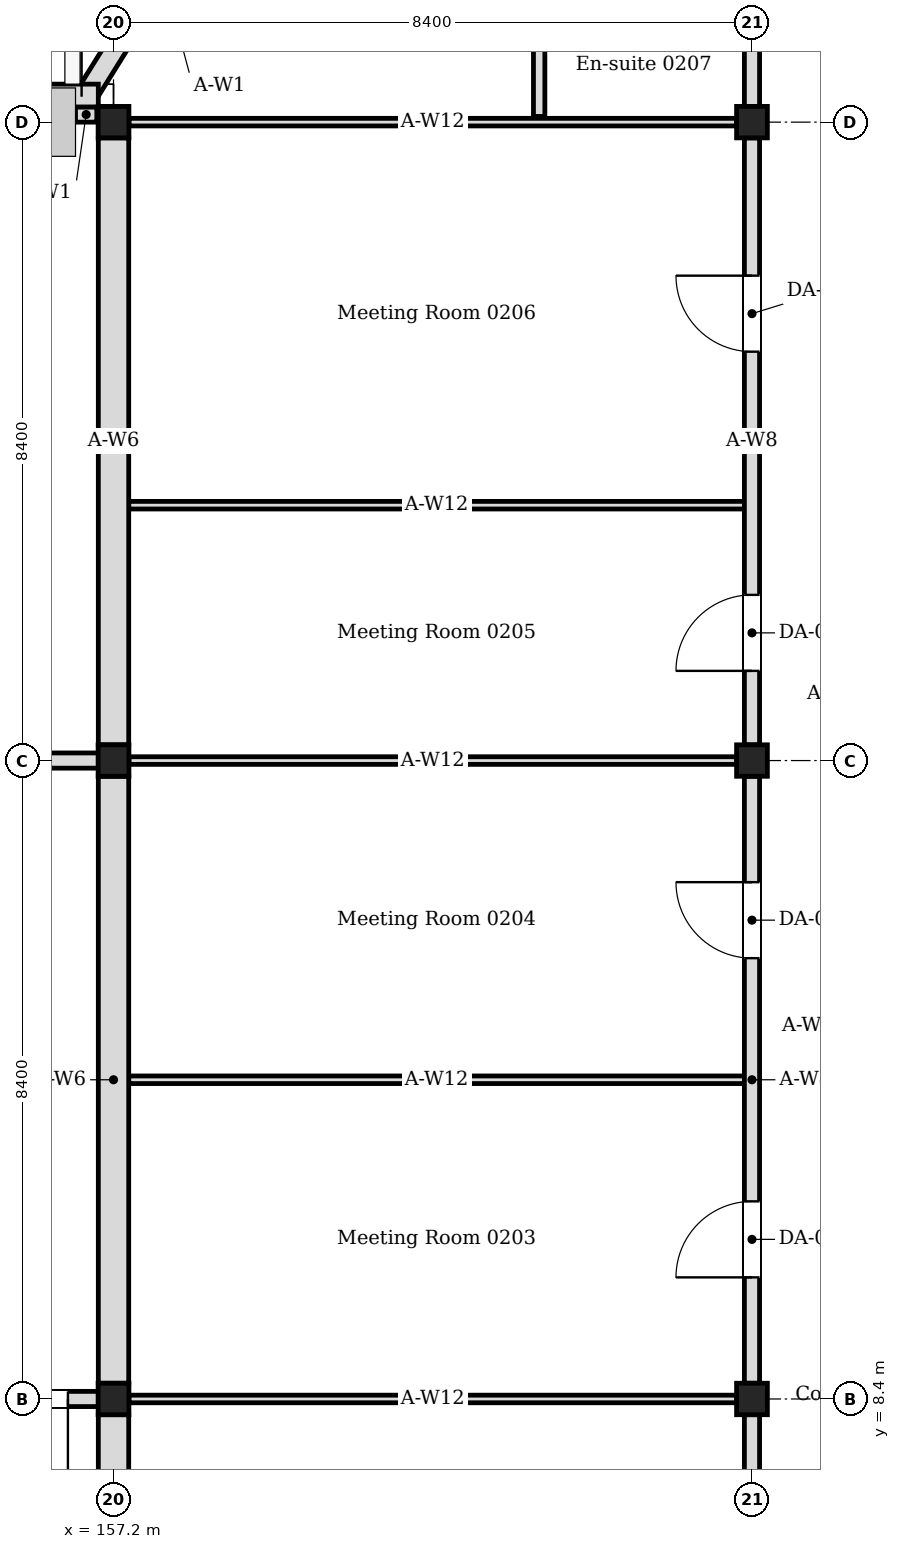
"""IFC4 building model, lengths in metres.
Left out: names, types, materials, properties, quantities, classifications, styles, units other than length and angle.
Written with IfcOpenShell. Run it as: python <this file> out.ifc"""

import sys

from ifc_helpers import new_model, si_unit, direction, frame, frame_2d, origin, origin_2d, place, context, subcontext, project, spatial, rectangle, i_section, extrude, element, fill, save


model = new_model("IFC4")
c1 = context("Model", 3, precision=1e-05, world=origin(), true_north=direction((0.0, 1.0)))
c2 = subcontext(c1, "Body", "Model", "MODEL_VIEW")
j1 = project(units=[si_unit("LENGTHUNIT", "METRE"), si_unit("PLANEANGLEUNIT", "RADIAN")], contexts=[c1])
p1 = place(None, origin())
s1 = spatial("IfcSite", under=j1, at=p1, CompositionType="ELEMENT")
p2 = place(p1, origin())
s2 = spatial("IfcBuilding", under=s1, at=p2, CompositionType="ELEMENT")
p3 = place(p2, frame((0.0, 0.0, 10.2)))
s3 = spatial("IfcBuildingStorey", under=s2, at=p3, CompositionType="ELEMENT", Elevation=10.2)
for number, where, z_axis, x_axis in (
    (1, (157.2, 8.4, 0.0), (0.0, 0.0, 1.0), (1.0, 0.0, 0.0)),
    (2, (157.2, 16.8, 0.0), (0.0, 0.0, 1.0), (1.0, 0.0, 0.0)),
    (3, (157.2, 25.2, 0.0), (0.0, 0.0, 1.0), (1.0, 0.0, 0.0)),
    (4, (165.6, 8.4, 0.0), (0.0, 0.0, 1.0), (1.0, 0.0, 0.0)),
    (5, (165.6, 16.8, 0.0), (0.0, 0.0, 1.0), (1.0, 0.0, 0.0)),
    (6, (165.6, 25.2, 0.0), (0.0, 0.0, 1.0), (1.0, 0.0, 0.0)),
):
    element("IfcColumn", number, at=place(p3, frame(where, z_axis=z_axis, x_axis=x_axis)), inside=s3, PredefinedType="COLUMN", context=c2, shape_type="SweptSolid", body=[
        extrude(i_section(OverallWidth=0.405, OverallDepth=0.414, WebThickness=0.018, FlangeThickness=0.028, FilletRadius=0.022, at=origin_2d()), origin(), (0.0, 0.0, 1.0), 4.2),
    ])
p4 = place(p3, frame((156.84, 25.2, 0.0), z_axis=(0.0, 0.0, 1.0), x_axis=(0.0, 1.0, 0.0)))
e7 = element("IfcWall", 7, at=p4, inside=s3, PredefinedType="SOLIDWALL", context=c2, shape_type="SweptSolid", body=[
    extrude(rectangle(XDim=0.2, YDim=0.28, at=frame_2d((0.1, 0.0))), origin(), (0.0, 0.0, 1.0), 4.05),
])
p5 = place(p3, frame((156.886, 25.624, 0.0), z_axis=(0.0, 0.0, 1.0), x_axis=(0.528992500338, 0.848626498871, 0.0)))
e8 = element("IfcWall", 8, at=p5, inside=s3, PredefinedType="SOLIDWALL", context=c2, shape_type="SweptSolid", body=[
    extrude(rectangle(XDim=4.145, YDim=0.28, at=frame_2d((2.072, 0.0))), origin(), (0.0, 0.0, 1.0), 4.05),
])
p6 = place(p5, frame((0.812, 0.0, 0.6)))
e9 = element("IfcOpeningElement", 9, at=p6, cuts=e8, PredefinedType="OPENING", context=c2, shape_type="SweptSolid", body=[
    extrude(rectangle(XDim=2.52, YDim=2.4, at=frame_2d((1.26, 1.2))), frame((0.0, 0.15, 0.0), z_axis=(0.0, -1.0, 0.0), x_axis=(1.0, 0.0, 0.0)), (0.0, 0.0, 1.0), 0.3),
])
p7 = place(p3, frame((151.1, 25.55, 0.0), z_axis=(0.0, 0.0, 1.0), x_axis=(1.0, 0.0, 0.0)))
e10 = element("IfcWall", 10, at=p7, inside=s3, PredefinedType="SOLIDWALL", context=c2, shape_type="SweptSolid", body=[
    extrude(rectangle(XDim=5.9, YDim=0.3, at=frame_2d((2.95, 0.0))), origin(), (0.0, 0.0, 1.0), 4.05),
])
p8 = place(p7, frame((0.34, 0.0, 1.5)))
e11 = element("IfcOpeningElement", 11, at=p8, cuts=e10, PredefinedType="OPENING", context=c2, shape_type="SweptSolid", body=[
    extrude(rectangle(XDim=1.2, YDim=1.2, at=frame_2d((0.6, 0.6))), frame((0.0, 0.16, 0.0), z_axis=(0.0, -1.0, 0.0), x_axis=(1.0, 0.0, 0.0)), (0.0, 0.0, 1.0), 0.32),
])
p9 = place(p7, frame((2.02, 0.0, 1.5)))
e12 = element("IfcOpeningElement", 12, at=p9, cuts=e10, PredefinedType="OPENING", context=c2, shape_type="SweptSolid", body=[
    extrude(rectangle(XDim=1.2, YDim=1.2, at=frame_2d((0.6, 0.6))), frame((0.0, 0.16, 0.0), z_axis=(0.0, -1.0, 0.0), x_axis=(1.0, 0.0, 0.0)), (0.0, 0.0, 1.0), 0.32),
])
p10 = place(p7, frame((3.7, 0.0, 1.5)))
e13 = element("IfcOpeningElement", 13, at=p10, cuts=e10, PredefinedType="OPENING", context=c2, shape_type="SweptSolid", body=[
    extrude(rectangle(XDim=1.2, YDim=1.2, at=frame_2d((0.6, 0.6))), frame((0.0, 0.16, 0.0), z_axis=(0.0, -1.0, 0.0), x_axis=(1.0, 0.0, 0.0)), (0.0, 0.0, 1.0), 0.32),
])
p11 = place(p3, frame((162.8, 25.275, 0.0), z_axis=(0.0, 0.0, 1.0), x_axis=(0.0, 1.0, 0.0)))
e14 = element("IfcWall", 14, at=p11, inside=s3, PredefinedType="PARTITIONING", context=c2, shape_type="SweptSolid", body=[
    extrude(rectangle(XDim=2.325, YDim=0.15, at=frame_2d((1.163, 0.0))), origin(), (0.0, 0.0, 1.0), 4.05),
])
for number, where, z_axis, x_axis in (
    (15, (157.403, 8.4, 0.0), (0.0, 0.0, 1.0), (1.0, 0.0, 0.0)),
    (16, (157.403, 16.8, 0.0), (0.0, 0.0, 1.0), (1.0, 0.0, 0.0)),
    (17, (157.403, 25.2, 0.0), (0.0, 0.0, 1.0), (1.0, 0.0, 0.0)),
):
    element("IfcWall", number, at=place(p3, frame(where, z_axis=z_axis, x_axis=x_axis)), inside=s3, PredefinedType="PARTITIONING", context=c2, shape_type="SweptSolid", body=[
        extrude(rectangle(XDim=7.995, YDim=0.1, at=frame_2d((3.998, 0.0))), origin(), (0.0, 0.0, 1.0), 3.604),
    ])
for number, where, z_axis, x_axis in (
    (18, (157.4, 12.6, 0.0), (0.0, 0.0, 1.0), (1.0, 0.0, 0.0)),
    (19, (157.4, 20.16, 0.0), (0.0, 0.0, 1.0), (1.0, 0.0, 0.0)),
):
    element("IfcWall", number, at=place(p3, frame(where, z_axis=z_axis, x_axis=x_axis)), inside=s3, PredefinedType="PARTITIONING", context=c2, shape_type="SweptSolid", body=[
        extrude(rectangle(XDim=8.1, YDim=0.1, at=frame_2d((4.05, 0.0))), origin(), (0.0, 0.0, 1.0), 3.604),
    ])
for number, where, z_axis, x_axis in (
    (20, (157.2, 0.207, 0.0), (0.0, 0.0, 1.0), (0.0, 1.0, 0.0)),
    (21, (157.2, 8.607, 0.0), (0.0, 0.0, 1.0), (0.0, 1.0, 0.0)),
):
    element("IfcWall", number, at=place(p3, frame(where, z_axis=z_axis, x_axis=x_axis)), inside=s3, PredefinedType="SOLIDWALL", context=c2, shape_type="SweptSolid", body=[
        extrude(rectangle(XDim=7.986, YDim=0.4, at=frame_2d((3.993, 0.0))), origin(), (0.0, 0.0, 1.0), 3.45),
    ])
p12 = place(p3, frame((157.2, 17.007, 0.0), z_axis=(0.0, 0.0, 1.0), x_axis=(0.0, 1.0, 0.0)))
e22 = element("IfcWall", 22, at=p12, inside=s3, PredefinedType="SOLIDWALL", context=c2, shape_type="SweptSolid", body=[
    extrude(rectangle(XDim=7.986, YDim=0.4, at=frame_2d((3.993, 0.0))), origin(), (0.0, 0.0, 1.0), 3.45),
])
p13 = place(p3, frame((165.6, 0.207, 0.0), z_axis=(0.0, 0.0, 1.0), x_axis=(0.0, 1.0, 0.0)))
e23 = element("IfcWall", 23, at=p13, inside=s3, PredefinedType="PARTITIONING", context=c2, shape_type="SweptSolid", body=[
    extrude(rectangle(XDim=7.986, YDim=0.2, at=frame_2d((3.993, 0.0))), origin(), (0.0, 0.0, 1.0), 3.45),
])
p14 = place(p13, frame((1.393, 0.0, 0.0)))
e24 = element("IfcOpeningElement", 24, at=p14, cuts=e23, PredefinedType="OPENING", context=c2, shape_type="SweptSolid", body=[
    extrude(rectangle(XDim=1.0, YDim=2.1, at=frame_2d((0.5, 1.05))), frame((0.0, 0.11, 0.0), z_axis=(0.0, -1.0, 0.0), x_axis=(1.0, 0.0, 0.0)), (0.0, 0.0, 1.0), 0.22),
])
p15 = place(p13, frame((5.593, 0.0, 0.0)))
e25 = element("IfcOpeningElement", 25, at=p15, cuts=e23, PredefinedType="OPENING", context=c2, shape_type="SweptSolid", body=[
    extrude(rectangle(XDim=1.0, YDim=2.1, at=frame_2d((0.5, 1.05))), frame((0.0, 0.11, 0.0), z_axis=(0.0, -1.0, 0.0), x_axis=(1.0, 0.0, 0.0)), (0.0, 0.0, 1.0), 0.22),
])
p16 = place(p3, frame((165.6, 8.607, 0.0), z_axis=(0.0, 0.0, 1.0), x_axis=(0.0, 1.0, 0.0)))
e26 = element("IfcWall", 26, at=p16, inside=s3, PredefinedType="PARTITIONING", context=c2, shape_type="SweptSolid", body=[
    extrude(rectangle(XDim=7.986, YDim=0.2, at=frame_2d((3.993, 0.0))), origin(), (0.0, 0.0, 1.0), 3.45),
])
p17 = place(p16, frame((1.393, 0.0, 0.0)))
e27 = element("IfcOpeningElement", 27, at=p17, cuts=e26, PredefinedType="OPENING", context=c2, shape_type="SweptSolid", body=[
    extrude(rectangle(XDim=1.0, YDim=2.1, at=frame_2d((0.5, 1.05))), frame((0.0, 0.11, 0.0), z_axis=(0.0, -1.0, 0.0), x_axis=(1.0, 0.0, 0.0)), (0.0, 0.0, 1.0), 0.22),
])
p18 = place(p16, frame((5.593, 0.0, 0.0)))
e28 = element("IfcOpeningElement", 28, at=p18, cuts=e26, PredefinedType="OPENING", context=c2, shape_type="SweptSolid", body=[
    extrude(rectangle(XDim=1.0, YDim=2.1, at=frame_2d((0.5, 1.05))), frame((0.0, 0.11, 0.0), z_axis=(0.0, -1.0, 0.0), x_axis=(1.0, 0.0, 0.0)), (0.0, 0.0, 1.0), 0.22),
])
p19 = place(p3, frame((165.6, 17.007, 0.0), z_axis=(0.0, 0.0, 1.0), x_axis=(0.0, 1.0, 0.0)))
e29 = element("IfcWall", 29, at=p19, inside=s3, PredefinedType="PARTITIONING", context=c2, shape_type="SweptSolid", body=[
    extrude(rectangle(XDim=7.986, YDim=0.2, at=frame_2d((3.993, 0.0))), origin(), (0.0, 0.0, 1.0), 3.45),
])
p20 = place(p19, frame((0.973, 0.0, 0.0)))
e30 = element("IfcOpeningElement", 30, at=p20, cuts=e29, PredefinedType="OPENING", context=c2, shape_type="SweptSolid", body=[
    extrude(rectangle(XDim=1.0, YDim=2.1, at=frame_2d((0.5, 1.05))), frame((0.0, 0.11, 0.0), z_axis=(0.0, -1.0, 0.0), x_axis=(1.0, 0.0, 0.0)), (0.0, 0.0, 1.0), 0.22),
])
p21 = place(p19, frame((5.173, 0.0, 0.0)))
e31 = element("IfcOpeningElement", 31, at=p21, cuts=e29, PredefinedType="OPENING", context=c2, shape_type="SweptSolid", body=[
    extrude(rectangle(XDim=1.0, YDim=2.1, at=frame_2d((0.5, 1.05))), frame((0.0, 0.11, 0.0), z_axis=(0.0, -1.0, 0.0), x_axis=(1.0, 0.0, 0.0)), (0.0, 0.0, 1.0), 0.22),
])
p22 = place(p3, frame((165.6, 25.407, 0.0), z_axis=(0.0, 0.0, 1.0), x_axis=(0.0, 1.0, 0.0)))
e32 = element("IfcWall", 32, at=p22, inside=s3, PredefinedType="PARTITIONING", context=c2, shape_type="SweptSolid", body=[
    extrude(rectangle(XDim=7.986, YDim=0.2, at=frame_2d((3.993, 0.0))), origin(), (0.0, 0.0, 1.0), 3.45),
])
p23 = place(p22, frame((2.493, 0.0, 0.0)))
e33 = element("IfcOpeningElement", 33, at=p23, cuts=e32, PredefinedType="OPENING", context=c2, shape_type="SweptSolid", body=[
    extrude(rectangle(XDim=1.2, YDim=2.1, at=frame_2d((0.6, 1.05))), frame((0.0, 0.11, 0.0), z_axis=(0.0, -1.0, 0.0), x_axis=(1.0, 0.0, 0.0)), (0.0, 0.0, 1.0), 0.22),
])
p24 = place(p22, frame((4.293, 0.0, 0.0)))
e34 = element("IfcOpeningElement", 34, at=p24, cuts=e32, PredefinedType="OPENING", context=c2, shape_type="SweptSolid", body=[
    extrude(rectangle(XDim=1.2, YDim=2.1, at=frame_2d((0.6, 1.05))), frame((0.0, 0.11, 0.0), z_axis=(0.0, -1.0, 0.0), x_axis=(1.0, 0.0, 0.0)), (0.0, 0.0, 1.0), 0.22),
])
p25 = place(p3, frame((151.35, 8.4, 0.0), z_axis=(0.0, 0.0, 1.0), x_axis=(1.0, 0.0, 0.0)))
e35 = element("IfcWall", 35, at=p25, inside=s3, PredefinedType="PARTITIONING", context=c2, shape_type="SweptSolid", body=[
    extrude(rectangle(XDim=5.85, YDim=0.2, at=frame_2d((2.925, 0.0))), origin(), (0.0, 0.0, 1.0), 3.35),
])
p26 = place(p25, frame((2.85, 0.0, 0.0)))
e36 = element("IfcOpeningElement", 36, at=p26, cuts=e35, PredefinedType="OPENING", context=c2, shape_type="SweptSolid", body=[
    extrude(rectangle(XDim=2.4, YDim=2.2, at=frame_2d((1.2, 1.1))), frame((0.0, 0.11, 0.0), z_axis=(0.0, -1.0, 0.0), x_axis=(1.0, 0.0, 0.0)), (0.0, 0.0, 1.0), 0.22),
])
p27 = place(p3, frame((151.35, 16.8, 0.0), z_axis=(0.0, 0.0, 1.0), x_axis=(1.0, 0.0, 0.0)))
e37 = element("IfcWall", 37, at=p27, inside=s3, PredefinedType="PARTITIONING", context=c2, shape_type="SweptSolid", body=[
    extrude(rectangle(XDim=5.85, YDim=0.2, at=frame_2d((2.925, 0.0))), origin(), (0.0, 0.0, 1.0), 3.35),
])
p28 = place(p27, frame((3.55, 0.0, 0.0)))
e38 = element("IfcOpeningElement", 38, at=p28, cuts=e37, PredefinedType="OPENING", context=c2, shape_type="SweptSolid", body=[
    extrude(rectangle(XDim=1.0, YDim=2.1, at=frame_2d((0.5, 1.05))), frame((0.0, 0.11, 0.0), z_axis=(0.0, -1.0, 0.0), x_axis=(1.0, 0.0, 0.0)), (0.0, 0.0, 1.0), 0.22),
])
p29 = place(p17, origin())
e39 = element("IfcDoor", 39, at=p29, inside=s3, OperationType="SINGLE_SWING_LEFT", PredefinedType="DOOR", context=c2, shape_type="SweptSolid", body=[
    extrude(rectangle(XDim=1.0, YDim=2.1, at=frame_2d((0.5, 1.05))), frame((0.0, 0.025, 0.0), z_axis=(0.0, -1.0, 0.0), x_axis=(1.0, 0.0, 0.0)), (0.0, 0.0, 1.0), 0.05),
])
fill(e27, e39)
p30 = place(p18, origin())
e40 = element("IfcDoor", 40, at=p30, inside=s3, OperationType="SINGLE_SWING_RIGHT", PredefinedType="DOOR", context=c2, shape_type="SweptSolid", body=[
    extrude(rectangle(XDim=1.0, YDim=2.1, at=frame_2d((0.5, 1.05))), frame((0.0, 0.025, 0.0), z_axis=(0.0, -1.0, 0.0), x_axis=(1.0, 0.0, 0.0)), (0.0, 0.0, 1.0), 0.05),
])
fill(e28, e40)
p31 = place(p20, origin())
e41 = element("IfcDoor", 41, at=p31, inside=s3, OperationType="SINGLE_SWING_LEFT", PredefinedType="DOOR", context=c2, shape_type="SweptSolid", body=[
    extrude(rectangle(XDim=1.0, YDim=2.1, at=frame_2d((0.5, 1.05))), frame((0.0, 0.025, 0.0), z_axis=(0.0, -1.0, 0.0), x_axis=(1.0, 0.0, 0.0)), (0.0, 0.0, 1.0), 0.05),
])
fill(e30, e41)
p32 = place(p21, origin())
e42 = element("IfcDoor", 42, at=p32, inside=s3, OperationType="SINGLE_SWING_RIGHT", PredefinedType="DOOR", context=c2, shape_type="SweptSolid", body=[
    extrude(rectangle(XDim=1.0, YDim=2.1, at=frame_2d((0.5, 1.05))), frame((0.0, 0.025, 0.0), z_axis=(0.0, -1.0, 0.0), x_axis=(1.0, 0.0, 0.0)), (0.0, 0.0, 1.0), 0.05),
])
fill(e31, e42)
p33 = place(p26, origin())
e43 = element("IfcDoor", 43, at=p33, inside=s3, OperationType="DOUBLE_DOOR_SINGLE_SWING", PredefinedType="DOOR", context=c2, shape_type="SweptSolid", body=[
    extrude(rectangle(XDim=2.4, YDim=2.2, at=frame_2d((1.2, 1.1))), frame((0.0, 0.025, 0.0), z_axis=(0.0, -1.0, 0.0), x_axis=(1.0, 0.0, 0.0)), (0.0, 0.0, 1.0), 0.05),
])
fill(e36, e43)
save(model, sys.argv[1])
